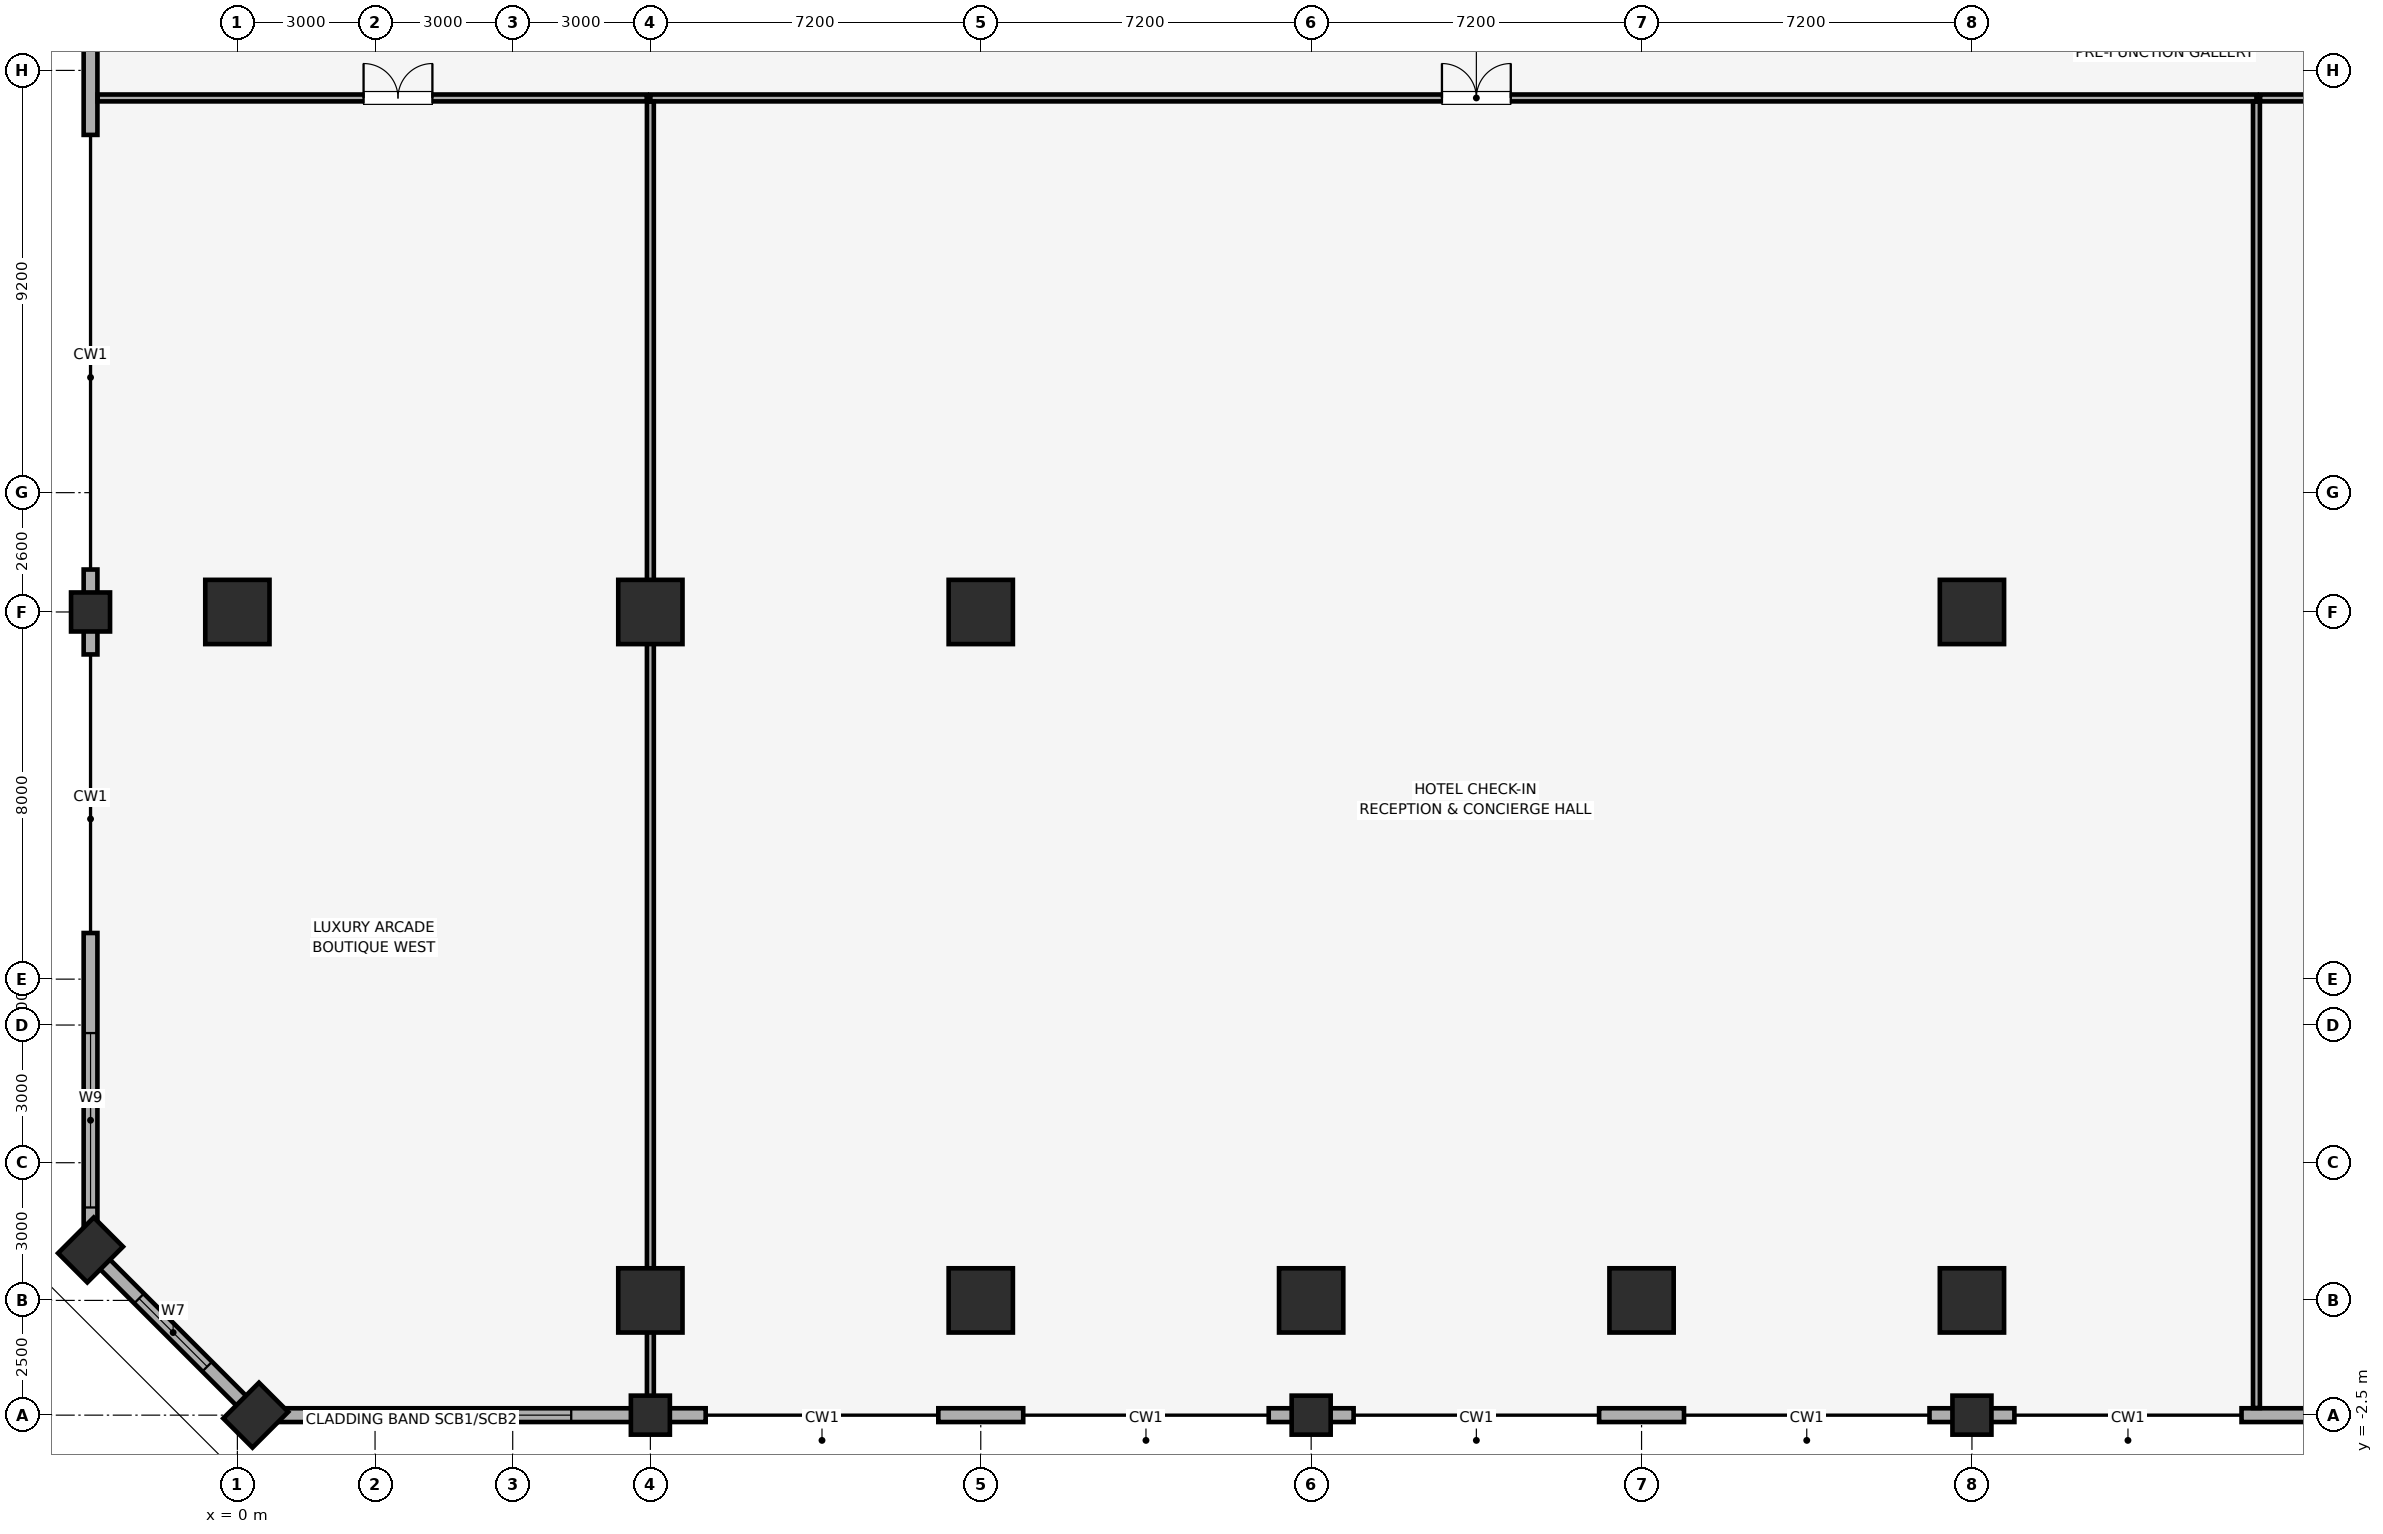
"""IFC4 building model, lengths in metres.
Left out: names, types, materials, properties, quantities, classifications, styles, units other than length and angle.
Written with IfcOpenShell. Run it as: python <this file> out.ifc"""

import sys

from ifc_helpers import new_model, si_unit, direction, frame, frame_2d, origin, origin_2d, place, context, subcontext, project, spatial, rectangle, extrude, element, fill, save


model = new_model("IFC4")
c1 = context("Model", 3, precision=1e-05, world=origin(), true_north=direction((0.0, 1.0)))
c2 = subcontext(c1, "Body", "Model", "MODEL_VIEW")
j1 = project(units=[si_unit("LENGTHUNIT", "METRE"), si_unit("PLANEANGLEUNIT", "RADIAN")], contexts=[c1])
p1 = place(None, origin())
s1 = spatial("IfcSite", under=j1, at=p1, CompositionType="ELEMENT")
p2 = place(p1, origin())
s2 = spatial("IfcBuilding", under=s1, at=p2, CompositionType="ELEMENT")
p3 = place(p2, frame((0.0, 0.0, 8.0)))
s3 = spatial("IfcBuildingStorey", under=s2, at=p3, CompositionType="ELEMENT", Elevation=8.0)
for number, where, z_axis, x_axis in (
    (1, (9.0, -2.5, 0.0), (0.0, 0.0, 1.0), (1.0, 0.0, 0.0)),
    (2, (23.4, -2.5, 0.0), (0.0, 0.0, 1.0), (1.0, 0.0, 0.0)),
    (3, (37.8, -2.5, 0.0), (0.0, 0.0, 1.0), (1.0, 0.0, 0.0)),
    (4, (-3.2, 15.0, 0.0), (0.0, 0.0, 1.0), (1.0, 0.0, 0.0)),
):
    element("IfcColumn", number, at=place(p3, frame(where, z_axis=z_axis, x_axis=x_axis)), inside=s3, PredefinedType="COLUMN", context=c2, shape_type="SweptSolid", body=[
        extrude(rectangle(XDim=0.85, YDim=0.85, at=origin_2d()), origin(), (0.0, 0.0, 1.0), 5.68),
    ])
for number, where, z_axis, x_axis in (
    (5, (0.4, -2.5, 0.0), (0.0, 0.0, 1.0), (0.707, 0.707, 0.0)),
    (6, (-3.2, 1.1, 0.0), (0.0, 0.0, 1.0), (0.707, 0.707, 0.0)),
):
    element("IfcColumn", number, at=place(p3, frame(where, z_axis=z_axis, x_axis=x_axis)), inside=s3, PredefinedType="PILASTER", context=c2, shape_type="SweptSolid", body=[
        extrude(rectangle(XDim=1.1, YDim=0.9, at=origin_2d()), origin(), (0.0, 0.0, 1.0), 5.68),
    ])
for number, where, z_axis, x_axis in (
    (7, (9.0, 0.0, 0.0), (0.0, 0.0, 1.0), (1.0, 0.0, 0.0)),
    (8, (16.2, 0.0, 0.0), (0.0, 0.0, 1.0), (1.0, 0.0, 0.0)),
    (9, (23.4, 0.0, 0.0), (0.0, 0.0, 1.0), (1.0, 0.0, 0.0)),
    (10, (30.6, 0.0, 0.0), (0.0, 0.0, 1.0), (1.0, 0.0, 0.0)),
    (11, (37.8, 0.0, 0.0), (0.0, 0.0, 1.0), (1.0, 0.0, 0.0)),
    (12, (9.0, 15.0, 0.0), (0.0, 0.0, 1.0), (1.0, 0.0, 0.0)),
    (13, (37.8, 15.0, 0.0), (0.0, 0.0, 1.0), (1.0, 0.0, 0.0)),
    (14, (16.2, 15.0, 0.0), (0.0, 0.0, 1.0), (1.0, 0.0, 0.0)),
    (15, (0.0, 15.0, 0.0), (0.0, 0.0, 1.0), (1.0, 0.0, 0.0)),
):
    element("IfcColumn", number, at=place(p3, frame(where, z_axis=z_axis, x_axis=x_axis)), inside=s3, PredefinedType="COLUMN", context=c2, shape_type="SweptSolid", body=[
        extrude(rectangle(XDim=1.4, YDim=1.4, at=origin_2d()), origin(), (0.0, 0.0, 1.0), 5.68),
    ])
p4 = place(p3, frame((0.4, -2.5, 0.0), z_axis=(0.0, 0.0, 1.0), x_axis=(1.0, 0.0, 0.0)))
e16 = element("IfcWall", 16, at=p4, inside=s3, PredefinedType="SOLIDWALL", context=c2, shape_type="SweptSolid", body=[
    extrude(rectangle(XDim=9.805, YDim=0.3, at=frame_2d((4.903, 0.0))), origin(), (0.0, 0.0, 1.0), 4.73),
])
p5 = place(p4, frame((1.475, 0.0, 0.85)))
e17 = element("IfcOpeningElement", 17, at=p5, cuts=e16, PredefinedType="OPENING", context=c2, shape_type="SweptSolid", body=[
    extrude(rectangle(XDim=5.4, YDim=2.4, at=frame_2d((2.7, 1.2))), frame((0.0, 0.16, 0.0), z_axis=(0.0, -1.0, 0.0), x_axis=(1.0, 0.0, 0.0)), (0.0, 0.0, 1.0), 0.32),
])
p6 = place(p3, frame((15.275, -2.5, 0.0), z_axis=(0.0, 0.0, 1.0), x_axis=(1.0, 0.0, 0.0)))
e18 = element("IfcWall", 18, at=p6, inside=s3, PredefinedType="SOLIDWALL", context=c2, shape_type="SweptSolid", body=[
    extrude(rectangle(XDim=1.85, YDim=0.3, at=frame_2d((0.925, 0.0))), origin(), (0.0, 0.0, 1.0), 4.73),
])
for number, where, z_axis, x_axis in (
    (19, (22.475, -2.5, 0.0), (0.0, 0.0, 1.0), (1.0, 0.0, 0.0)),
    (20, (29.675, -2.5, 0.0), (0.0, 0.0, 1.0), (1.0, 0.0, 0.0)),
):
    element("IfcWall", number, at=place(p3, frame(where, z_axis=z_axis, x_axis=x_axis)), inside=s3, PredefinedType="SOLIDWALL", context=c2, shape_type="SweptSolid", body=[
        extrude(rectangle(XDim=1.85, YDim=0.3, at=frame_2d((0.925, 0.0))), origin(), (0.0, 0.0, 1.0), 4.73),
    ])
p7 = place(p3, frame((36.875, -2.5, 0.0), z_axis=(0.0, 0.0, 1.0), x_axis=(1.0, 0.0, 0.0)))
e21 = element("IfcWall", 21, at=p7, inside=s3, PredefinedType="SOLIDWALL", context=c2, shape_type="SweptSolid", body=[
    extrude(rectangle(XDim=1.85, YDim=0.3, at=frame_2d((0.925, 0.0))), origin(), (0.0, 0.0, 1.0), 4.73),
])
p8 = place(p3, frame((43.675, -2.5, 0.0), z_axis=(0.0, 0.0, 1.0), x_axis=(1.0, 0.0, 0.0)))
e22 = element("IfcWall", 22, at=p8, inside=s3, PredefinedType="SOLIDWALL", context=c2, shape_type="SweptSolid", body=[
    extrude(rectangle(XDim=3.45, YDim=0.3, at=frame_2d((1.725, 0.0))), origin(), (0.0, 0.0, 1.0), 4.73),
])
p9 = place(p3, frame((-3.2, 48.9, 0.0), z_axis=(0.0, 0.0, 1.0), x_axis=(0.0, -1.0, 0.0)))
e23 = element("IfcWall", 23, at=p9, inside=s3, PredefinedType="SOLIDWALL", context=c2, shape_type="SweptSolid", body=[
    extrude(rectangle(XDim=23.505, YDim=0.3, at=frame_2d((11.752, 0.0))), origin(), (0.0, 0.0, 1.0), 4.73),
])
p10 = place(p9, frame((12.5, 0.0, 0.85)))
e24 = element("IfcOpeningElement", 24, at=p10, cuts=e23, PredefinedType="OPENING", context=c2, shape_type="SweptSolid", body=[
    extrude(rectangle(XDim=3.8, YDim=2.2, at=frame_2d((1.9, 1.1))), frame((0.0, 0.16, 0.0), z_axis=(0.0, -1.0, 0.0), x_axis=(1.0, 0.0, 0.0)), (0.0, 0.0, 1.0), 0.32),
])
p11 = place(p9, frame((4.2, 0.0, 0.85)))
e25 = element("IfcOpeningElement", 25, at=p11, cuts=e23, PredefinedType="OPENING", context=c2, shape_type="SweptSolid", body=[
    extrude(rectangle(XDim=3.8, YDim=2.2, at=frame_2d((1.9, 1.1))), frame((0.0, 0.16, 0.0), z_axis=(0.0, -1.0, 0.0), x_axis=(1.0, 0.0, 0.0)), (0.0, 0.0, 1.0), 0.32),
])
p12 = place(p3, frame((-3.2, 15.925, 0.0), z_axis=(0.0, 0.0, 1.0), x_axis=(0.0, -1.0, 0.0)))
e26 = element("IfcWall", 26, at=p12, inside=s3, PredefinedType="SOLIDWALL", context=c2, shape_type="SweptSolid", body=[
    extrude(rectangle(XDim=1.85, YDim=0.3, at=frame_2d((0.925, 0.0))), origin(), (0.0, 0.0, 1.0), 4.73),
])
p13 = place(p3, frame((-3.2, 8.005, 0.0), z_axis=(0.0, 0.0, 1.0), x_axis=(0.0, -1.0, 0.0)))
e27 = element("IfcWall", 27, at=p13, inside=s3, PredefinedType="SOLIDWALL", context=c2, shape_type="SweptSolid", body=[
    extrude(rectangle(XDim=6.905, YDim=0.3, at=frame_2d((3.452, 0.0))), origin(), (0.0, 0.0, 1.0), 4.73),
])
p14 = place(p13, frame((2.18, 0.0, 0.85)))
e28 = element("IfcOpeningElement", 28, at=p14, cuts=e27, PredefinedType="OPENING", context=c2, shape_type="SweptSolid", body=[
    extrude(rectangle(XDim=3.8, YDim=2.2, at=frame_2d((1.9, 1.1))), frame((0.0, 0.16, 0.0), z_axis=(0.0, -1.0, 0.0), x_axis=(1.0, 0.0, 0.0)), (0.0, 0.0, 1.0), 0.32),
])
p15 = place(p3, frame((-3.2, 1.1, 0.0), z_axis=(0.0, 0.0, 1.0), x_axis=(0.707082803744, -0.707130757816, 0.0)))
e29 = element("IfcWall", 29, at=p15, inside=s3, PredefinedType="SOLIDWALL", context=c2, shape_type="SweptSolid", body=[
    extrude(rectangle(XDim=5.091, YDim=0.3, at=frame_2d((2.545, 0.0))), origin(), (0.0, 0.0, 1.0), 4.73),
])
p16 = place(p15, frame((1.496, 0.0, 0.85)))
e30 = element("IfcOpeningElement", 30, at=p16, cuts=e29, PredefinedType="OPENING", context=c2, shape_type="SweptSolid", body=[
    extrude(rectangle(XDim=2.1, YDim=1.6, at=frame_2d((1.05, 0.8))), frame((0.0, 0.16, 0.0), z_axis=(0.0, -1.0, 0.0), x_axis=(1.0, 0.0, 0.0)), (0.0, 0.0, 1.0), 0.32),
])
p17 = place(p3, frame((9.0, 26.2, 0.0), z_axis=(0.0, 0.0, 1.0), x_axis=(1.0, 0.0, 0.0)))
e31 = element("IfcWall", 31, at=p17, inside=s3, PredefinedType="PARTITIONING", context=c2, shape_type="SweptSolid", body=[
    extrude(rectangle(XDim=35.0, YDim=0.15, at=frame_2d((17.5, 0.0))), origin(), (0.0, 0.0, 1.0), 5.68),
])
p18 = place(p17, frame((17.25, 0.0, 0.0)))
e32 = element("IfcOpeningElement", 32, at=p18, cuts=e31, PredefinedType="OPENING", context=c2, shape_type="SweptSolid", body=[
    extrude(rectangle(XDim=1.5, YDim=2.25, at=frame_2d((0.75, 1.125))), frame((0.0, 0.085, 0.0), z_axis=(0.0, -1.0, 0.0), x_axis=(1.0, 0.0, 0.0)), (0.0, 0.0, 1.0), 0.17),
])
p19 = place(p3, frame((9.0, -2.345, 0.0), z_axis=(0.0, 0.0, 1.0), x_axis=(0.0, 1.0, 0.0)))
e33 = element("IfcWall", 33, at=p19, inside=s3, PredefinedType="PARTITIONING", context=c2, shape_type="SweptSolid", body=[
    extrude(rectangle(XDim=28.465, YDim=0.15, at=frame_2d((14.232, 0.0))), origin(), (0.0, 0.0, 1.0), 4.992),
])
p20 = place(p3, frame((44.0, -2.345, 0.0), z_axis=(0.0, 0.0, 1.0), x_axis=(0.0, 1.0, 0.0)))
e34 = element("IfcWall", 34, at=p20, inside=s3, PredefinedType="PARTITIONING", context=c2, shape_type="SweptSolid", body=[
    extrude(rectangle(XDim=28.465, YDim=0.15, at=frame_2d((14.232, 0.0))), origin(), (0.0, 0.0, 1.0), 5.68),
])
p21 = place(p3, frame((44.08, 26.2, 0.0), z_axis=(0.0, 0.0, 1.0), x_axis=(1.0, 0.0, 0.0)))
e35 = element("IfcWall", 35, at=p21, inside=s3, PredefinedType="PARTITIONING", context=c2, shape_type="SweptSolid", body=[
    extrude(rectangle(XDim=27.92, YDim=0.15, at=frame_2d((13.96, 0.0))), origin(), (0.0, 0.0, 1.0), 5.68),
])
p22 = place(p21, frame((13.17, 0.0, 0.0)))
e36 = element("IfcOpeningElement", 36, at=p22, cuts=e35, PredefinedType="OPENING", context=c2, shape_type="SweptSolid", body=[
    extrude(rectangle(XDim=1.5, YDim=2.25, at=frame_2d((0.75, 1.125))), frame((0.0, 0.085, 0.0), z_axis=(0.0, -1.0, 0.0), x_axis=(1.0, 0.0, 0.0)), (0.0, 0.0, 1.0), 0.17),
])
p23 = place(p3, frame((-3.045, 26.2, 0.0), z_axis=(0.0, 0.0, 1.0), x_axis=(1.0, 0.0, 0.0)))
e37 = element("IfcWall", 37, at=p23, inside=s3, PredefinedType="PARTITIONING", context=c2, shape_type="SweptSolid", body=[
    extrude(rectangle(XDim=11.965, YDim=0.15, at=frame_2d((5.982, 0.0))), origin(), (0.0, 0.0, 1.0), 5.68),
])
p24 = place(p23, frame((5.795, 0.0, 0.0)))
e38 = element("IfcOpeningElement", 38, at=p24, cuts=e37, PredefinedType="OPENING", context=c2, shape_type="SweptSolid", body=[
    extrude(rectangle(XDim=1.5, YDim=2.25, at=frame_2d((0.75, 1.125))), frame((0.0, 0.085, 0.0), z_axis=(0.0, -1.0, 0.0), x_axis=(1.0, 0.0, 0.0)), (0.0, 0.0, 1.0), 0.17),
])
p25 = place(p16, origin())
e39 = element("IfcWindow", 39, at=p25, inside=s3, PartitioningType="SINGLE_PANEL", PredefinedType="WINDOW", context=c2, shape_type="SweptSolid", body=[
    extrude(rectangle(XDim=2.1, YDim=1.6, at=frame_2d((1.05, 0.8))), frame((0.0, 0.03, 0.0), z_axis=(0.0, -1.0, 0.0), x_axis=(1.0, 0.0, 0.0)), (0.0, 0.0, 1.0), 0.06),
])
fill(e30, e39)
p26 = place(p5, origin())
e40 = element("IfcWindow", 40, at=p26, inside=s3, PartitioningType="SINGLE_PANEL", PredefinedType="WINDOW", context=c2, shape_type="SweptSolid", body=[
    extrude(rectangle(XDim=5.4, YDim=2.4, at=frame_2d((2.7, 1.2))), frame((0.0, 0.03, 0.0), z_axis=(0.0, -1.0, 0.0), x_axis=(1.0, 0.0, 0.0)), (0.0, 0.0, 1.0), 0.06),
])
fill(e17, e40)
p27 = place(p14, origin())
e41 = element("IfcWindow", 41, at=p27, inside=s3, PartitioningType="SINGLE_PANEL", PredefinedType="WINDOW", context=c2, shape_type="SweptSolid", body=[
    extrude(rectangle(XDim=3.8, YDim=2.2, at=frame_2d((1.9, 1.1))), frame((0.0, 0.03, 0.0), z_axis=(0.0, -1.0, 0.0), x_axis=(1.0, 0.0, 0.0)), (0.0, 0.0, 1.0), 0.06),
])
fill(e28, e41)
p28 = place(p18, origin())
e42 = element("IfcDoor", 42, at=p28, inside=s3, OperationType="DOUBLE_DOOR_SINGLE_SWING", PredefinedType="DOOR", context=c2, shape_type="SweptSolid", body=[
    extrude(rectangle(XDim=1.5, YDim=2.25, at=frame_2d((0.75, 1.125))), frame((0.0, 0.025, 0.0), z_axis=(0.0, -1.0, 0.0), x_axis=(1.0, 0.0, 0.0)), (0.0, 0.0, 1.0), 0.05),
])
fill(e32, e42)
p29 = place(p24, origin())
e43 = element("IfcDoor", 43, at=p29, inside=s3, OperationType="DOUBLE_DOOR_SINGLE_SWING", PredefinedType="DOOR", context=c2, shape_type="SweptSolid", body=[
    extrude(rectangle(XDim=1.5, YDim=2.25, at=frame_2d((0.75, 1.125))), frame((0.0, 0.025, 0.0), z_axis=(0.0, -1.0, 0.0), x_axis=(1.0, 0.0, 0.0)), (0.0, 0.0, 1.0), 0.05),
])
fill(e38, e43)
save(model, sys.argv[1])
